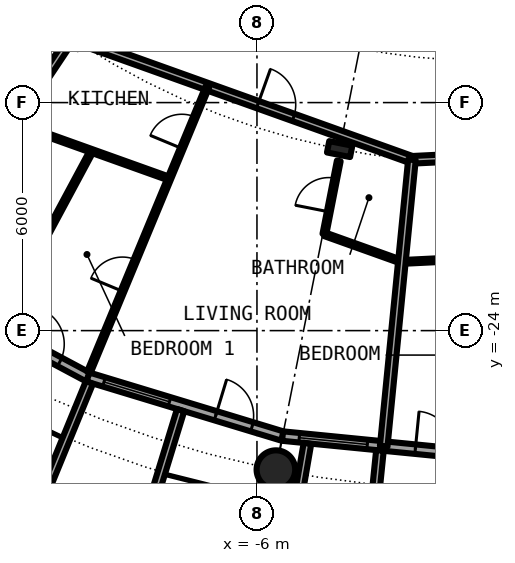
"""IFC4 building model, lengths in metres.
Left out: names, types, materials, properties, quantities, classifications, styles, units other than length and angle.
Written with IfcOpenShell. Run it as: python <this file> out.ifc"""

import sys

from ifc_helpers import new_model, si_unit, direction, frame, frame_2d, origin, origin_2d, place, context, subcontext, project, spatial, rectangle, circle, hollow_circle, i_section, extrude, element, fill, save


model = new_model("IFC4")
c1 = context("Model", 3, precision=1e-05, world=origin(), true_north=direction((0.0, 1.0)))
c2 = subcontext(c1, "Body", "Model", "MODEL_VIEW")
j1 = project(units=[si_unit("LENGTHUNIT", "METRE"), si_unit("PLANEANGLEUNIT", "RADIAN")], contexts=[c1])
p1 = place(None, origin())
s1 = spatial("IfcSite", under=j1, at=p1, CompositionType="ELEMENT")
p2 = place(p1, origin())
s2 = spatial("IfcBuilding", under=s1, at=p2, CompositionType="ELEMENT")
p3 = place(p2, frame((0.0, 0.0, 22.8)))
s3 = spatial("IfcBuildingStorey", under=s2, at=p3, CompositionType="ELEMENT", Elevation=22.8)
p4 = place(p3, frame((-5.501, -27.658, 0.0), z_axis=(0.0, 0.0, 1.0), x_axis=(1.0, 0.0, 0.0)))
e1 = element("IfcColumn", 1, at=p4, inside=s3, PredefinedType="COLUMN", context=c2, shape_type="SweptSolid", body=[
    extrude(hollow_circle(Radius=0.508, WallThickness=0.05, at=origin_2d()), origin(), (0.0, 0.0, 1.0), 3.05),
])
p5 = place(p3, frame((-3.824, -19.223, 0.0), z_axis=(0.0, 0.0, 1.0), x_axis=(-0.195090322016, -0.980785280403, 0.0)))
e2 = element("IfcColumn", 2, at=p5, inside=s3, PredefinedType="COLUMN", context=c2, shape_type="SweptSolid", body=[
    extrude(i_section(OverallWidth=0.305, OverallDepth=0.62, WebThickness=0.021, FlangeThickness=0.04, FilletRadius=0.027, at=origin_2d()), origin(), (0.0, 0.0, 1.0), 3.05),
])
p6 = place(p3, frame((-15.167, -22.699, 0.0), z_axis=(0.0, 0.0, 1.0), x_axis=(0.881915646801, -0.471407246368, 0.0)))
e3 = element("IfcWall", 3, at=p6, inside=s3, PredefinedType="SOLIDWALL", context=c2, shape_type="SweptSolid", body=[
    extrude(rectangle(XDim=5.352, YDim=0.25, at=frame_2d((2.676, 0.0))), origin(), (0.0, 0.0, 1.0), 2.7),
])
p7 = place(p6, frame((0.441, 0.0, 0.3)))
e4 = element("IfcOpeningElement", 4, at=p7, cuts=e3, PredefinedType="OPENING", context=c2, shape_type="SweptSolid", body=[
    extrude(rectangle(XDim=1.8, YDim=2.1, at=frame_2d((0.9, 1.05))), frame((0.0, 0.135, 0.0), z_axis=(0.0, -1.0, 0.0), x_axis=(1.0, 0.0, 0.0)), (0.0, 0.0, 1.0), 0.27),
])
p8 = place(p6, frame((3.51, 0.0, 0.0)))
e5 = element("IfcOpeningElement", 5, at=p8, cuts=e3, PredefinedType="OPENING", context=c2, shape_type="SweptSolid", body=[
    extrude(rectangle(XDim=1.0, YDim=2.2, at=frame_2d((0.5, 1.1))), frame((0.0, 0.135, 0.0), z_axis=(0.0, -1.0, 0.0), x_axis=(1.0, 0.0, 0.0)), (0.0, 0.0, 1.0), 0.27),
])
p9 = place(p3, frame((-10.447, -25.222, 0.0), z_axis=(0.0, 0.0, 1.0), x_axis=(0.956965678721, -0.290201119486, 0.0)))
e6 = element("IfcWall", 6, at=p9, inside=s3, PredefinedType="SOLIDWALL", context=c2, shape_type="SweptSolid", body=[
    extrude(rectangle(XDim=5.351, YDim=0.25, at=frame_2d((2.676, 0.0))), origin(), (0.0, 0.0, 1.0), 2.7),
])
p10 = place(p9, frame((0.441, 0.0, 0.3)))
e7 = element("IfcOpeningElement", 7, at=p10, cuts=e6, PredefinedType="OPENING", context=c2, shape_type="SweptSolid", body=[
    extrude(rectangle(XDim=1.8, YDim=2.1, at=frame_2d((0.9, 1.05))), frame((0.0, 0.135, 0.0), z_axis=(0.0, -1.0, 0.0), x_axis=(1.0, 0.0, 0.0)), (0.0, 0.0, 1.0), 0.27),
])
p11 = place(p9, frame((3.51, 0.0, 0.0)))
e8 = element("IfcOpeningElement", 8, at=p11, cuts=e6, PredefinedType="OPENING", context=c2, shape_type="SweptSolid", body=[
    extrude(rectangle(XDim=1.0, YDim=2.2, at=frame_2d((0.5, 1.1))), frame((0.0, 0.135, 0.0), z_axis=(0.0, -1.0, 0.0), x_axis=(1.0, 0.0, 0.0)), (0.0, 0.0, 1.0), 0.27),
])
p12 = place(p3, frame((-11.638, -28.084, -0.03), z_axis=(0.0, 0.0, 1.0), x_axis=(0.941461077774, -0.337121697664, 0.0)))
e9 = element("IfcWall", 9, at=p12, inside=s3, PredefinedType="SOLIDWALL", context=c2, shape_type="SweptSolid", body=[
    extrude(rectangle(XDim=2.993, YDim=0.2, at=frame_2d((1.497, 0.0))), origin(), (0.0, 0.0, 1.0), 2.73),
])
p13 = place(p12, frame((0.457, 0.0, 0.33)))
e10 = element("IfcOpeningElement", 10, at=p13, cuts=e9, PredefinedType="OPENING", context=c2, shape_type="SweptSolid", body=[
    extrude(circle(Radius=1.04, at=frame_2d((1.04, 1.04))), frame((0.0, 0.11, 0.0), z_axis=(0.0, -1.0, 0.0), x_axis=(1.0, 0.0, 0.0)), (0.0, 0.0, 1.0), 0.22),
])
p14 = place(p3, frame((-10.409, -25.364, -0.03), z_axis=(0.0, 0.0, 1.0), x_axis=(-0.379509886562, -0.925187681501, 0.0)))
e11 = element("IfcWall", 11, at=p14, inside=s3, PredefinedType="SOLIDWALL", context=c2, shape_type="SweptSolid", body=[
    extrude(rectangle(XDim=2.883, YDim=0.2, at=frame_2d((1.441, 0.0))), origin(), (0.0, 0.0, 1.0), 2.73),
])
p15 = place(p3, frame((-8.009, -26.092, -0.03), z_axis=(0.0, 0.0, 1.0), x_axis=(-0.293406695073, -0.955987715029, 0.0)))
e12 = element("IfcWall", 12, at=p15, inside=s3, PredefinedType="SOLIDWALL", context=c2, shape_type="SweptSolid", body=[
    extrude(rectangle(XDim=3.006, YDim=0.2, at=frame_2d((1.503, 0.0))), origin(), (0.0, 0.0, 1.0), 2.73),
])
p16 = place(p3, frame((-5.326, -26.775, 0.0), z_axis=(0.0, 0.0, 1.0), x_axis=(0.995173996315, -0.098126026407, 0.0)))
e13 = element("IfcWall", 13, at=p16, inside=s3, PredefinedType="SOLIDWALL", context=c2, shape_type="SweptSolid", body=[
    extrude(rectangle(XDim=5.352, YDim=0.25, at=frame_2d((2.676, 0.0))), origin(), (0.0, 0.0, 1.0), 2.7),
])
p17 = place(p16, frame((0.441, 0.0, 0.3)))
e14 = element("IfcOpeningElement", 14, at=p17, cuts=e13, PredefinedType="OPENING", context=c2, shape_type="SweptSolid", body=[
    extrude(rectangle(XDim=1.8, YDim=2.1, at=frame_2d((0.9, 1.05))), frame((0.0, 0.135, 0.0), z_axis=(0.0, -1.0, 0.0), x_axis=(1.0, 0.0, 0.0)), (0.0, 0.0, 1.0), 0.27),
])
p18 = place(p16, frame((3.51, 0.0, 0.0)))
e15 = element("IfcOpeningElement", 15, at=p18, cuts=e13, PredefinedType="OPENING", context=c2, shape_type="SweptSolid", body=[
    extrude(rectangle(XDim=1.0, YDim=2.2, at=frame_2d((0.5, 1.1))), frame((0.0, 0.135, 0.0), z_axis=(0.0, -1.0, 0.0), x_axis=(1.0, 0.0, 0.0)), (0.0, 0.0, 1.0), 0.27),
])
p19 = place(p3, frame((-4.671, -26.966, -0.03), z_axis=(0.0, 0.0, 1.0), x_axis=(-0.170539878907, -0.985350774954, 0.0)))
e16 = element("IfcWall", 16, at=p19, inside=s3, PredefinedType="SOLIDWALL", context=c2, shape_type="SweptSolid", body=[
    extrude(rectangle(XDim=2.932, YDim=0.2, at=frame_2d((1.466, 0.0))), origin(), (0.0, 0.0, 1.0), 2.73),
])
p20 = place(p3, frame((-2.764, -27.153, -0.03), z_axis=(0.0, 0.0, 1.0), x_axis=(-0.101505487237, -0.994834979311, 0.0)))
e17 = element("IfcWall", 17, at=p20, inside=s3, PredefinedType="SOLIDWALL", context=c2, shape_type="SweptSolid", body=[
    extrude(rectangle(XDim=3.007, YDim=0.2, at=frame_2d((1.503, 0.0))), origin(), (0.0, 0.0, 1.0), 2.73),
])
p21 = place(p3, frame((-2.186, -22.193, 0.0), z_axis=(0.0, 0.0, 1.0), x_axis=(0.998792477005, 0.049128279821, 0.0)))
e18 = element("IfcWall", 18, at=p21, inside=s3, PredefinedType="PARTITIONING", context=c2, shape_type="SweptSolid", body=[
    extrude(rectangle(XDim=2.182, YDim=0.1, at=frame_2d((1.091, 0.0))), origin(), (0.0, 0.0, 1.0), 2.7),
])
p22 = place(p3, frame((-12.389, -18.542, 0.0), z_axis=(0.0, 0.0, 1.0), x_axis=(0.941556976264, -0.336853767159, 0.0)))
e19 = element("IfcWall", 19, at=p22, inside=s3, PredefinedType="PARTITIONING", context=c2, shape_type="SweptSolid", body=[
    extrude(rectangle(XDim=4.334, YDim=0.1, at=frame_2d((2.167, 0.0))), origin(), (0.0, 0.0, 1.0), 2.7),
])
p23 = place(p3, frame((-4.216, -21.466, 0.0), z_axis=(0.0, 0.0, 1.0), x_axis=(0.941588922545, -0.33676445914, 0.0)))
e20 = element("IfcWall", 20, at=p23, inside=s3, PredefinedType="PARTITIONING", context=c2, shape_type="SweptSolid", body=[
    extrude(rectangle(XDim=2.168, YDim=0.1, at=frame_2d((1.084, 0.0))), origin(), (0.0, 0.0, 1.0), 2.7),
])
p24 = place(p3, frame((-1.921, -19.506, 0.0), z_axis=(0.0, 0.0, 1.0), x_axis=(0.99878260749, 0.04932852092, 0.0)))
e21 = element("IfcWall", 21, at=p24, inside=s3, PredefinedType="PARTITIONING", context=c2, shape_type="SweptSolid", body=[
    extrude(rectangle(XDim=5.598, YDim=0.2, at=frame_2d((2.799, 0.0))), origin(), (0.0, 0.0, 1.0), 2.38),
])
p25 = place(p24, frame((1.417, 0.0, 0.0)))
e22 = element("IfcOpeningElement", 22, at=p25, cuts=e21, PredefinedType="OPENING", context=c2, shape_type="SweptSolid", body=[
    extrude(rectangle(XDim=1.0, YDim=2.3, at=frame_2d((0.5, 1.15))), frame((0.0, 0.11, 0.0), z_axis=(0.0, -1.0, 0.0), x_axis=(1.0, 0.0, 0.0)), (0.0, 0.0, 1.0), 0.22),
])
p26 = place(p3, frame((-10.741, -16.35, 0.0), z_axis=(0.0, 0.0, 1.0), x_axis=(0.941539496009, -0.336902623105, 0.0)))
e23 = element("IfcWall", 23, at=p26, inside=s3, PredefinedType="PARTITIONING", context=c2, shape_type="SweptSolid", body=[
    extrude(rectangle(XDim=9.368, YDim=0.2, at=frame_2d((4.684, 0.0))), origin(), (0.0, 0.0, 1.0), 2.38),
])
p27 = place(p26, frame((5.057, 0.0, 0.0)))
e24 = element("IfcOpeningElement", 24, at=p27, cuts=e23, PredefinedType="OPENING", context=c2, shape_type="SweptSolid", body=[
    extrude(rectangle(XDim=1.0, YDim=2.3, at=frame_2d((0.5, 1.15))), frame((0.0, 0.11, 0.0), z_axis=(0.0, -1.0, 0.0), x_axis=(1.0, 0.0, 0.0)), (0.0, 0.0, 1.0), 0.22),
])
p28 = place(p3, frame((-15.098, -22.595, 0.0), z_axis=(0.0, 0.0, 1.0), x_axis=(0.55566921314, 0.831403467378, 0.0)))
e25 = element("IfcWall", 25, at=p28, inside=s3, PredefinedType="PARTITIONING", context=c2, shape_type="SweptSolid", body=[
    extrude(rectangle(XDim=7.265, YDim=0.2, at=frame_2d((3.632, 0.0))), origin(), (0.0, 0.0, 1.0), 2.7),
])
p29 = place(p3, frame((-12.856, -23.942, 0.0), z_axis=(0.0, 0.0, 1.0), x_axis=(0.472967735543, 0.881079747319, 0.0)))
e26 = element("IfcWall", 26, at=p29, inside=s3, PredefinedType="PARTITIONING", context=c2, shape_type="SweptSolid", body=[
    extrude(rectangle(XDim=5.3, YDim=0.1, at=frame_2d((2.65, 0.0))), origin(), (0.0, 0.0, 1.0), 2.7),
])
p30 = place(p29, frame((2.2, 0.0, 0.0)))
e27 = element("IfcOpeningElement", 27, at=p30, cuts=e26, PredefinedType="OPENING", context=c2, shape_type="SweptSolid", body=[
    extrude(rectangle(XDim=0.9, YDim=2.3, at=frame_2d((0.45, 1.15))), frame((0.0, 0.06, 0.0), z_axis=(0.0, -1.0, 0.0), x_axis=(1.0, 0.0, 0.0)), (0.0, 0.0, 1.0), 0.12),
])
p31 = place(p3, frame((-10.424, -25.096, 0.0), z_axis=(0.0, 0.0, 1.0), x_axis=(0.383616168183, 0.923492628833, 0.0)))
e28 = element("IfcWall", 28, at=p31, inside=s3, PredefinedType="PARTITIONING", context=c2, shape_type="SweptSolid", body=[
    extrude(rectangle(XDim=8.138, YDim=0.1, at=frame_2d((4.069, 0.0))), origin(), (0.0, 0.0, 1.0), 2.7),
])
p32 = place(p31, frame((6.377, 0.0, 0.0)))
e29 = element("IfcOpeningElement", 29, at=p32, cuts=e28, PredefinedType="OPENING", context=c2, shape_type="SweptSolid", body=[
    extrude(rectangle(XDim=0.9, YDim=2.3, at=frame_2d((0.45, 1.15))), frame((0.0, 0.06, 0.0), z_axis=(0.0, -1.0, 0.0), x_axis=(1.0, 0.0, 0.0)), (0.0, 0.0, 1.0), 0.12),
])
p33 = place(p31, frame((2.308, 0.0, 0.0)))
e30 = element("IfcOpeningElement", 30, at=p33, cuts=e28, PredefinedType="OPENING", context=c2, shape_type="SweptSolid", body=[
    extrude(rectangle(XDim=0.9, YDim=2.3, at=frame_2d((0.45, 1.15))), frame((0.0, 0.06, 0.0), z_axis=(0.0, -1.0, 0.0), x_axis=(1.0, 0.0, 0.0)), (0.0, 0.0, 1.0), 0.12),
])
p34 = place(p3, frame((-4.226, -21.462, 0.0), z_axis=(0.0, 0.0, 1.0), x_axis=(0.193055213522, 0.981187894611, 0.0)))
e31 = element("IfcWall", 31, at=p34, inside=s3, PredefinedType="PARTITIONING", context=c2, shape_type="SweptSolid", body=[
    extrude(rectangle(XDim=1.964, YDim=0.1, at=frame_2d((0.982, 0.0))), origin(), (0.0, 0.0, 1.0), 2.7),
])
p35 = place(p34, frame((0.6, 0.0, 0.0)))
e32 = element("IfcOpeningElement", 32, at=p35, cuts=e31, PredefinedType="OPENING", context=c2, shape_type="SweptSolid", body=[
    extrude(rectangle(XDim=0.9, YDim=2.3, at=frame_2d((0.45, 1.15))), frame((0.0, 0.06, 0.0), z_axis=(0.0, -1.0, 0.0), x_axis=(1.0, 0.0, 0.0)), (0.0, 0.0, 1.0), 0.12),
])
p36 = place(p3, frame((-2.665, -27.044, 0.0), z_axis=(0.0, 0.0, 1.0), x_axis=(0.098083473227, 0.99517819122, 0.0)))
e33 = element("IfcWall", 33, at=p36, inside=s3, PredefinedType="PARTITIONING", context=c2, shape_type="SweptSolid", body=[
    extrude(rectangle(XDim=7.574, YDim=0.2, at=frame_2d((3.787, 0.0))), origin(), (0.0, 0.0, 1.0), 2.7),
])
p37 = place(p8, origin())
e34 = element("IfcDoor", 34, at=p37, inside=s3, OperationType="SINGLE_SWING_LEFT", PredefinedType="DOOR", context=c2, shape_type="SweptSolid", body=[
    extrude(rectangle(XDim=1.0, YDim=2.2, at=frame_2d((0.5, 1.1))), frame((0.0, 0.025, 0.0), z_axis=(0.0, -1.0, 0.0), x_axis=(1.0, 0.0, 0.0)), (0.0, 0.0, 1.0), 0.05),
])
fill(e5, e34)
p38 = place(p10, origin())
e35 = element("IfcWindow", 35, at=p38, inside=s3, PartitioningType="SINGLE_PANEL", PredefinedType="WINDOW", context=c2, shape_type="SweptSolid", body=[
    extrude(rectangle(XDim=1.8, YDim=2.1, at=frame_2d((0.9, 1.05))), frame((0.0, 0.03, 0.0), z_axis=(0.0, -1.0, 0.0), x_axis=(1.0, 0.0, 0.0)), (0.0, 0.0, 1.0), 0.06),
])
fill(e7, e35)
p39 = place(p11, origin())
e36 = element("IfcDoor", 36, at=p39, inside=s3, OperationType="SINGLE_SWING_LEFT", PredefinedType="DOOR", context=c2, shape_type="SweptSolid", body=[
    extrude(rectangle(XDim=1.0, YDim=2.2, at=frame_2d((0.5, 1.1))), frame((0.0, 0.025, 0.0), z_axis=(0.0, -1.0, 0.0), x_axis=(1.0, 0.0, 0.0)), (0.0, 0.0, 1.0), 0.05),
])
fill(e8, e36)
p40 = place(p17, origin())
e37 = element("IfcWindow", 37, at=p40, inside=s3, PartitioningType="SINGLE_PANEL", PredefinedType="WINDOW", context=c2, shape_type="SweptSolid", body=[
    extrude(rectangle(XDim=1.8, YDim=2.1, at=frame_2d((0.9, 1.05))), frame((0.0, 0.03, 0.0), z_axis=(0.0, -1.0, 0.0), x_axis=(1.0, 0.0, 0.0)), (0.0, 0.0, 1.0), 0.06),
])
fill(e14, e37)
p41 = place(p18, origin())
e38 = element("IfcDoor", 38, at=p41, inside=s3, OperationType="SINGLE_SWING_LEFT", PredefinedType="DOOR", context=c2, shape_type="SweptSolid", body=[
    extrude(rectangle(XDim=1.0, YDim=2.2, at=frame_2d((0.5, 1.1))), frame((0.0, 0.025, 0.0), z_axis=(0.0, -1.0, 0.0), x_axis=(1.0, 0.0, 0.0)), (0.0, 0.0, 1.0), 0.05),
])
fill(e15, e38)
p42 = place(p27, origin())
e39 = element("IfcDoor", 39, at=p42, inside=s3, OperationType="SINGLE_SWING_RIGHT", PredefinedType="DOOR", context=c2, shape_type="SweptSolid", body=[
    extrude(rectangle(XDim=1.0, YDim=2.3, at=frame_2d((0.5, 1.15))), frame((0.0, 0.025, 0.0), z_axis=(0.0, -1.0, 0.0), x_axis=(1.0, 0.0, 0.0)), (0.0, 0.0, 1.0), 0.05),
])
fill(e24, e39)
p43 = place(p35, origin())
e40 = element("IfcDoor", 40, at=p43, inside=s3, OperationType="SINGLE_SWING_RIGHT", PredefinedType="DOOR", context=c2, shape_type="SweptSolid", body=[
    extrude(rectangle(XDim=0.9, YDim=2.3, at=frame_2d((0.45, 1.15))), frame((0.0, 0.025, 0.0), z_axis=(0.0, -1.0, 0.0), x_axis=(1.0, 0.0, 0.0)), (0.0, 0.0, 1.0), 0.05),
])
fill(e32, e40)
p44 = place(p32, origin())
e41 = element("IfcDoor", 41, at=p44, inside=s3, OperationType="SINGLE_SWING_RIGHT", PredefinedType="DOOR", context=c2, shape_type="SweptSolid", body=[
    extrude(rectangle(XDim=0.9, YDim=2.3, at=frame_2d((0.45, 1.15))), frame((0.0, 0.025, 0.0), z_axis=(0.0, -1.0, 0.0), x_axis=(1.0, 0.0, 0.0)), (0.0, 0.0, 1.0), 0.05),
])
fill(e29, e41)
p45 = place(p33, origin())
e42 = element("IfcDoor", 42, at=p45, inside=s3, OperationType="SINGLE_SWING_LEFT", PredefinedType="DOOR", context=c2, shape_type="SweptSolid", body=[
    extrude(rectangle(XDim=0.9, YDim=2.3, at=frame_2d((0.45, 1.15))), frame((0.0, 0.025, 0.0), z_axis=(0.0, -1.0, 0.0), x_axis=(1.0, 0.0, 0.0)), (0.0, 0.0, 1.0), 0.05),
])
fill(e30, e42)
p46 = place(p30, origin())
e43 = element("IfcDoor", 43, at=p46, inside=s3, OperationType="SINGLE_SWING_RIGHT", PredefinedType="DOOR", context=c2, shape_type="SweptSolid", body=[
    extrude(rectangle(XDim=0.9, YDim=2.3, at=frame_2d((0.45, 1.15))), frame((0.0, 0.025, 0.0), z_axis=(0.0, -1.0, 0.0), x_axis=(1.0, 0.0, 0.0)), (0.0, 0.0, 1.0), 0.05),
])
fill(e27, e43)
save(model, sys.argv[1])
